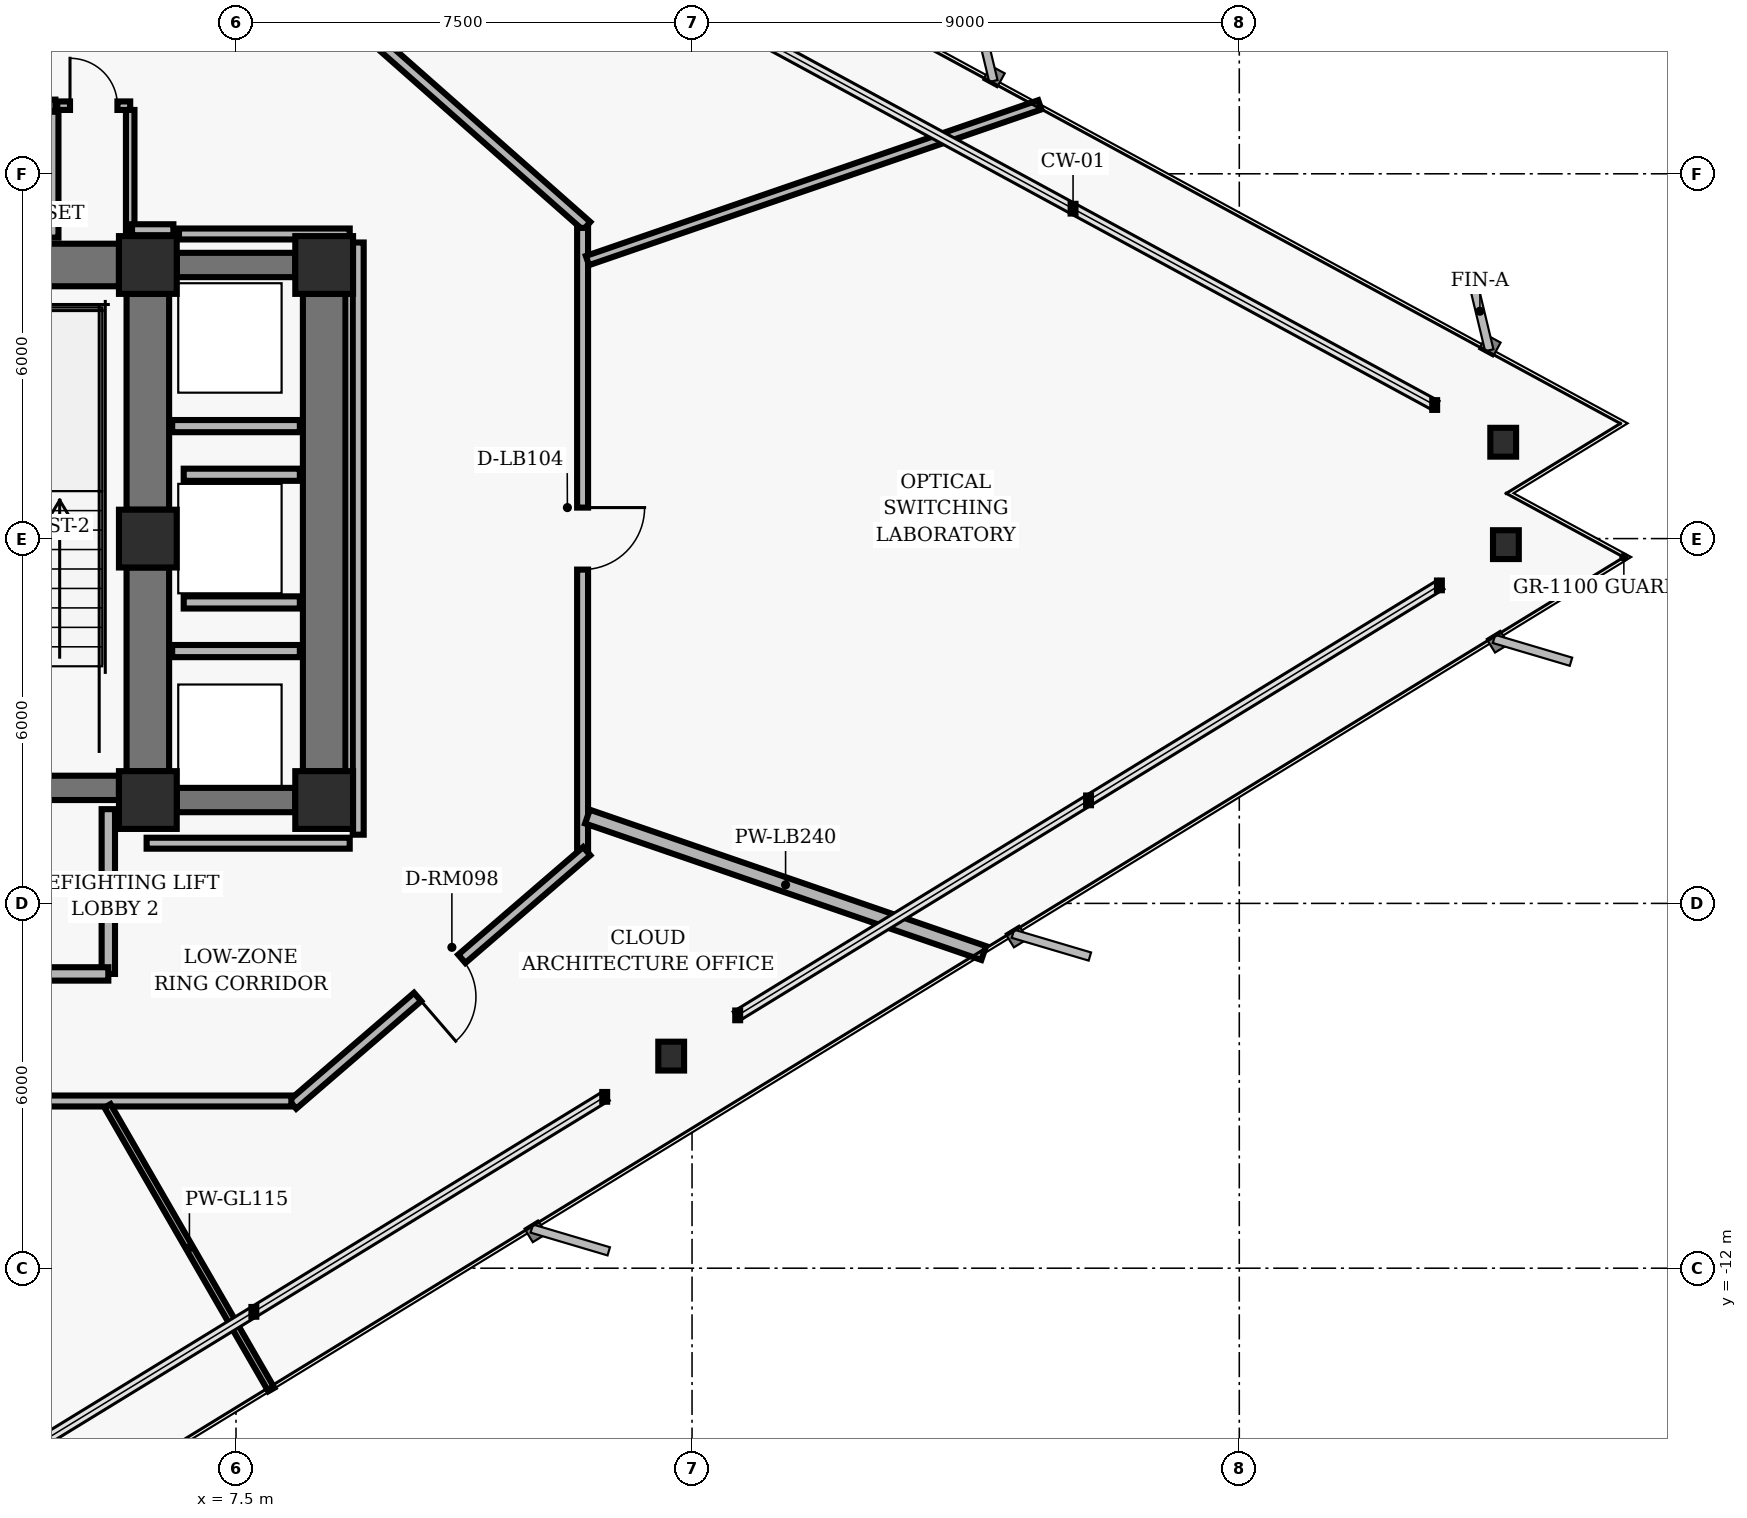
"""IFC4 building model, lengths in metres.
Left out: names, types, materials, properties, quantities, classifications, styles, units other than length and angle.
Written with IfcOpenShell. Run it as: python <this file> out.ifc"""

import sys

from ifc_helpers import new_model, si_unit, direction, frame, frame_2d, origin, origin_2d, place, context, subcontext, project, spatial, rectangle, hollow_rectangle, i_section, extrude, element, fill, save


model = new_model("IFC4")
c1 = context("Model", 3, precision=1e-05, world=origin(), true_north=direction((0.0, 1.0)))
c2 = subcontext(c1, "Body", "Model", "MODEL_VIEW")
j1 = project(units=[si_unit("LENGTHUNIT", "METRE"), si_unit("PLANEANGLEUNIT", "RADIAN")], contexts=[c1])
p1 = place(None, origin())
s1 = spatial("IfcSite", under=j1, at=p1, CompositionType="ELEMENT")
p2 = place(p1, origin())
s2 = spatial("IfcBuilding", under=s1, at=p2, CompositionType="ELEMENT")
p3 = place(p2, frame((0.0, 0.0, 39.04)))
s3 = spatial("IfcBuildingStorey", under=s2, at=p3, CompositionType="ELEMENT", Elevation=39.04)
for number, where, z_axis, x_axis in (
    (1, (6.05, 4.5, 0.0), (0.0, 0.0, 1.0), (1.0, 0.0, 0.0)),
    (2, (6.05, 0.0, 0.0), (0.0, 0.0, 1.0), (1.0, 0.0, 0.0)),
    (3, (6.05, -4.3, 0.0), (0.0, 0.0, 1.0), (1.0, 0.0, 0.0)),
    (4, (8.95, 4.5, 0.0), (0.0, 0.0, 1.0), (1.0, 0.0, 0.0)),
    (5, (8.95, -4.3, 0.0), (0.0, 0.0, 1.0), (1.0, 0.0, 0.0)),
):
    element("IfcColumn", number, at=place(p3, frame(where, z_axis=z_axis, x_axis=x_axis)), inside=s3, PredefinedType="COLUMN", context=c2, shape_type="SweptSolid", body=[
        extrude(hollow_rectangle(XDim=0.95, YDim=0.95, WallThickness=0.06, InnerFilletRadius=0.02, OuterFilletRadius=0.04, at=origin_2d()), origin(), (0.0, 0.0, 1.0), 3.36),
    ])
p4 = place(p3, frame((6.05, 0.475, 0.0), z_axis=(0.0, 0.0, 1.0), x_axis=(0.0, 1.0, 0.0)))
e6 = element("IfcWall", 6, at=p4, inside=s3, PredefinedType="SHEAR", context=c2, shape_type="SweptSolid", body=[
    extrude(rectangle(XDim=3.55, YDim=0.7, at=frame_2d((1.775, 0.0))), origin(), (0.0, 0.0, 1.0), 3.098),
])
p5 = place(p3, frame((6.05, -3.825, 0.0), z_axis=(0.0, 0.0, 1.0), x_axis=(0.0, 1.0, 0.0)))
e7 = element("IfcWall", 7, at=p5, inside=s3, PredefinedType="SHEAR", context=c2, shape_type="SweptSolid", body=[
    extrude(rectangle(XDim=3.35, YDim=0.7, at=frame_2d((1.675, 0.0))), origin(), (0.0, 0.0, 1.0), 3.098),
])
p6 = place(p3, frame((-5.575, -4.1, 0.0), z_axis=(0.0, 0.0, 1.0), x_axis=(1.0, 0.0, 0.0)))
e8 = element("IfcWall", 8, at=p6, inside=s3, PredefinedType="SHEAR", context=c2, shape_type="SweptSolid", body=[
    extrude(rectangle(XDim=11.15, YDim=0.4, at=frame_2d((5.575, 0.0))), origin(), (0.0, 0.0, 1.0), 3.098),
])
p7 = place(p6, frame((1.305, 0.0, 0.0)))
e9 = element("IfcOpeningElement", 9, at=p7, cuts=e8, PredefinedType="OPENING", context=c2, shape_type="SweptSolid", body=[
    extrude(rectangle(XDim=1.1, YDim=2.04, at=frame_2d((0.55, 1.02))), frame((0.0, 0.21, 0.0), z_axis=(0.0, -1.0, 0.0), x_axis=(1.0, 0.0, 0.0)), (0.0, 0.0, 1.0), 0.42),
])
p8 = place(p6, frame((8.745, 0.0, 0.0)))
e10 = element("IfcOpeningElement", 10, at=p8, cuts=e8, PredefinedType="OPENING", context=c2, shape_type="SweptSolid", body=[
    extrude(rectangle(XDim=1.1, YDim=2.04, at=frame_2d((0.55, 1.02))), frame((0.0, 0.21, 0.0), z_axis=(0.0, -1.0, 0.0), x_axis=(1.0, 0.0, 0.0)), (0.0, 0.0, 1.0), 0.42),
])
p9 = place(p6, frame((4.045, 0.0, 0.0)))
e11 = element("IfcOpeningElement", 11, at=p9, cuts=e8, PredefinedType="OPENING", context=c2, shape_type="SweptSolid", body=[
    extrude(rectangle(XDim=1.06, YDim=2.04, at=frame_2d((0.53, 1.02))), frame((0.0, 0.21, 0.0), z_axis=(0.0, -1.0, 0.0), x_axis=(1.0, 0.0, 0.0)), (0.0, 0.0, 1.0), 0.42),
])
p10 = place(p6, frame((6.045, 0.0, 0.0)))
e12 = element("IfcOpeningElement", 12, at=p10, cuts=e8, PredefinedType="OPENING", context=c2, shape_type="SweptSolid", body=[
    extrude(rectangle(XDim=1.06, YDim=2.04, at=frame_2d((0.53, 1.02))), frame((0.0, 0.21, 0.0), z_axis=(0.0, -1.0, 0.0), x_axis=(1.0, 0.0, 0.0)), (0.0, 0.0, 1.0), 0.42),
])
p11 = place(p3, frame((2.05, 4.5, 0.0), z_axis=(0.0, 0.0, 1.0), x_axis=(1.0, 0.0, 0.0)))
e13 = element("IfcWall", 13, at=p11, inside=s3, PredefinedType="SHEAR", context=c2, shape_type="SweptSolid", body=[
    extrude(rectangle(XDim=3.525, YDim=0.7, at=frame_2d((1.762, 0.0))), origin(), (0.0, 0.0, 1.0), 3.098),
])
p12 = place(p3, frame((8.95, -3.825, 0.0), z_axis=(0.0, 0.0, 1.0), x_axis=(0.0, 1.0, 0.0)))
e14 = element("IfcWall", 14, at=p12, inside=s3, PredefinedType="SHEAR", context=c2, shape_type="SweptSolid", body=[
    extrude(rectangle(XDim=7.85, YDim=0.7, at=frame_2d((3.925, 0.0))), origin(), (0.0, 0.0, 1.0), 3.098),
])
for number, where, z_axis, x_axis in (
    (15, (6.525, 4.5, 0.0), (0.0, 0.0, 1.0), (1.0, 0.0, 0.0)),
    (16, (6.525, -4.3, 0.0), (0.0, 0.0, 1.0), (1.0, 0.0, 0.0)),
):
    element("IfcWall", number, at=place(p3, frame(where, z_axis=z_axis, x_axis=x_axis)), inside=s3, PredefinedType="SHEAR", context=c2, shape_type="SweptSolid", body=[
        extrude(rectangle(XDim=1.95, YDim=0.4, at=frame_2d((0.975, 0.0))), origin(), (0.0, 0.0, 1.0), 3.098),
    ])
for number, where, z_axis, x_axis in (
    (17, (28.341, 1.585, 0.0), (0.0, 0.0, 1.0), (1.0, 0.0, 0.0)),
    (18, (14.657, -8.512, 0.0), (0.0, 0.0, 1.0), (1.0, 0.0, 0.0)),
    (19, (28.385, -0.1, 0.0), (0.0, 0.0, 1.0), (1.0, 0.0, 0.0)),
):
    element("IfcColumn", number, at=place(p3, frame(where, z_axis=z_axis, x_axis=x_axis)), inside=s3, PredefinedType="COLUMN", context=c2, shape_type="SweptSolid", body=[
        extrude(i_section(OverallWidth=0.424, OverallDepth=0.474, WebThickness=0.048, FlangeThickness=0.077, FilletRadius=0.025, at=origin_2d()), origin(), (0.0, 0.0, 1.0), 3.36),
    ])
p13 = place(p3, frame((5.4, -7.16, 0.0), z_axis=(0.0, 0.0, 1.0), x_axis=(0.0, 1.0, 0.0)))
e20 = element("IfcWall", 20, at=p13, inside=s3, PredefinedType="PARTITIONING", context=c2, shape_type="SweptSolid", body=[
    extrude(rectangle(XDim=2.71, YDim=0.22, at=frame_2d((1.355, 0.0))), origin(), (0.0, 0.0, 1.0), 3.073),
])
p14 = place(p3, frame((0.0, -7.16, 0.0), z_axis=(0.0, 0.0, 1.0), x_axis=(1.0, 0.0, 0.0)))
e21 = element("IfcWall", 21, at=p14, inside=s3, PredefinedType="PARTITIONING", context=c2, shape_type="SweptSolid", body=[
    extrude(rectangle(XDim=5.4, YDim=0.22, at=frame_2d((2.7, 0.0))), origin(), (0.0, 0.0, 1.0), 3.073),
])
p15 = place(p14, frame((2.05, 0.0, 0.0)))
e22 = element("IfcOpeningElement", 22, at=p15, cuts=e21, PredefinedType="OPENING", context=c2, shape_type="SweptSolid", body=[
    extrude(rectangle(XDim=1.12, YDim=2.02, at=frame_2d((0.56, 1.01))), frame((0.0, 0.12, 0.0), z_axis=(0.0, -1.0, 0.0), x_axis=(1.0, 0.0, 0.0)), (0.0, 0.0, 1.0), 0.24),
])
p16 = place(p3, frame((4.48, 4.95, 0.0), z_axis=(0.0, 0.0, 1.0), x_axis=(0.0, 1.0, 0.0)))
e23 = element("IfcWall", 23, at=p16, inside=s3, PredefinedType="PARTITIONING", context=c2, shape_type="SweptSolid", body=[
    extrude(rectangle(XDim=2.1, YDim=0.2, at=frame_2d((1.05, 0.0))), origin(), (0.0, 0.0, 1.0), 3.073),
])
p17 = place(p3, frame((2.15, 7.12, 0.0), z_axis=(0.0, 0.0, 1.0), x_axis=(1.0, 0.0, 0.0)))
e24 = element("IfcWall", 24, at=p17, inside=s3, PredefinedType="PARTITIONING", context=c2, shape_type="SweptSolid", body=[
    extrude(rectangle(XDim=2.38, YDim=0.2, at=frame_2d((1.19, 0.0))), origin(), (0.0, 0.0, 1.0), 3.073),
])
p18 = place(p17, frame((0.56, 0.0, 0.0)))
e25 = element("IfcOpeningElement", 25, at=p18, cuts=e24, PredefinedType="OPENING", context=c2, shape_type="SweptSolid", body=[
    extrude(rectangle(XDim=1.26, YDim=2.06, at=frame_2d((0.63, 1.03))), frame((0.0, 0.11, 0.0), z_axis=(0.0, -1.0, 0.0), x_axis=(1.0, 0.0, 0.0)), (0.0, 0.0, 1.0), 0.22),
])
p19 = place(p3, frame((5.76, 4.95, 0.0), z_axis=(0.0, 0.0, 1.0), x_axis=(0.0, 1.0, 0.0)))
e26 = element("IfcWall", 26, at=p19, inside=s3, PredefinedType="PARTITIONING", context=c2, shape_type="SweptSolid", body=[
    extrude(rectangle(XDim=2.1, YDim=0.14, at=frame_2d((1.05, 0.0))), origin(), (0.0, 0.0, 1.0), 3.073),
])
p20 = place(p3, frame((4.56, 7.12, 0.0), z_axis=(0.0, 0.0, 1.0), x_axis=(1.0, 0.0, 0.0)))
e27 = element("IfcWall", 27, at=p20, inside=s3, PredefinedType="PARTITIONING", context=c2, shape_type="SweptSolid", body=[
    extrude(rectangle(XDim=1.2, YDim=0.14, at=frame_2d((0.6, 0.0))), origin(), (0.0, 0.0, 1.0), 3.073),
])
p21 = place(p20, frame((0.21, 0.0, 0.0)))
e28 = element("IfcOpeningElement", 28, at=p21, cuts=e27, PredefinedType="OPENING", context=c2, shape_type="SweptSolid", body=[
    extrude(rectangle(XDim=0.78, YDim=2.01, at=frame_2d((0.39, 1.005))), frame((0.0, 0.08, 0.0), z_axis=(0.0, -1.0, 0.0), x_axis=(1.0, 0.0, 0.0)), (0.0, 0.0, 1.0), 0.16),
])
for number, where, z_axis, x_axis in (
    (29, (6.45, -1.85, 0.0), (0.0, 0.0, 1.0), (1.0, 0.0, 0.0)),
    (30, (6.45, 1.85, 0.0), (0.0, 0.0, 1.0), (1.0, 0.0, 0.0)),
):
    element("IfcWall", number, at=place(p3, frame(where, z_axis=z_axis, x_axis=x_axis)), inside=s3, PredefinedType="PARTITIONING", context=c2, shape_type="SweptSolid", body=[
        extrude(rectangle(XDim=2.1, YDim=0.2, at=frame_2d((1.05, 0.0))), origin(), (0.0, 0.0, 1.0), 3.073),
    ])
for number, where, z_axis, x_axis in (
    (31, (6.64, -1.05, 0.0), (0.0, 0.0, 1.0), (1.0, 0.0, 0.0)),
    (32, (6.64, 1.05, 0.0), (0.0, 0.0, 1.0), (1.0, 0.0, 0.0)),
):
    element("IfcWall", number, at=place(p3, frame(where, z_axis=z_axis, x_axis=x_axis)), inside=s3, PredefinedType="PARTITIONING", context=c2, shape_type="SweptSolid", body=[
        extrude(rectangle(XDim=1.91, YDim=0.2, at=frame_2d((0.955, 0.0))), origin(), (0.0, 0.0, 1.0), 3.073),
    ])
p22 = place(p3, frame((8.567, 9.29, 0.0), z_axis=(0.0, 0.0, 1.0), x_axis=(0.749626463267, -0.66186113768, 0.0)))
e33 = element("IfcWall", 33, at=p22, inside=s3, PredefinedType="PARTITIONING", context=c2, shape_type="SweptSolid", body=[
    extrude(rectangle(XDim=6.27, YDim=0.18, at=frame_2d((3.135, 0.0))), origin(), (0.0, 0.0, 1.0), 2.587),
])
p23 = place(p3, frame((13.2, 5.11, 0.0), z_axis=(0.0, 0.0, 1.0), x_axis=(0.0, -1.0, 0.0)))
e34 = element("IfcWall", 34, at=p23, inside=s3, PredefinedType="PARTITIONING", context=c2, shape_type="SweptSolid", body=[
    extrude(rectangle(XDim=10.22, YDim=0.18, at=frame_2d((5.11, 0.0))), origin(), (0.0, 0.0, 1.0), 3.073),
])
p24 = place(p23, frame((4.6, 0.0, 0.0)))
e35 = element("IfcOpeningElement", 35, at=p24, cuts=e34, PredefinedType="OPENING", context=c2, shape_type="SweptSolid", body=[
    extrude(rectangle(XDim=1.02, YDim=2.02, at=frame_2d((0.51, 1.01))), frame((0.0, 0.1, 0.0), z_axis=(0.0, -1.0, 0.0), x_axis=(1.0, 0.0, 0.0)), (0.0, 0.0, 1.0), 0.2),
])
p25 = place(p3, frame((13.268, -5.141, 0.0), z_axis=(0.0, 0.0, 1.0), x_axis=(-0.757534501725, -0.65279512766, 0.0)))
e36 = element("IfcWall", 36, at=p25, inside=s3, PredefinedType="PARTITIONING", context=c2, shape_type="SweptSolid", body=[
    extrude(rectangle(XDim=6.385, YDim=0.18, at=frame_2d((3.192, 0.0))), origin(), (0.0, 0.0, 1.0), 2.587),
])
p26 = place(p25, frame((2.712, 0.0, 0.0)))
e37 = element("IfcOpeningElement", 37, at=p26, cuts=e36, PredefinedType="OPENING", context=c2, shape_type="SweptSolid", body=[
    extrude(rectangle(XDim=0.96, YDim=2.02, at=frame_2d((0.48, 1.01))), frame((0.0, 0.1, 0.0), z_axis=(0.0, -1.0, 0.0), x_axis=(1.0, 0.0, 0.0)), (0.0, 0.0, 1.0), 0.2),
])
p27 = place(p3, frame((8.41, -9.25, 0.0), z_axis=(0.0, 0.0, 1.0), x_axis=(-1.0, 0.0, 0.0)))
e38 = element("IfcWall", 38, at=p27, inside=s3, PredefinedType="PARTITIONING", context=c2, shape_type="SweptSolid", body=[
    extrude(rectangle(XDim=17.0, YDim=0.18, at=frame_2d((8.5, 0.0))), origin(), (0.0, 0.0, 1.0), 2.587),
])
p28 = place(p27, frame((9.399, 0.0, 0.0)))
e39 = element("IfcOpeningElement", 39, at=p28, cuts=e38, PredefinedType="OPENING", context=c2, shape_type="SweptSolid", body=[
    extrude(rectangle(XDim=0.96, YDim=2.02, at=frame_2d((0.48, 1.01))), frame((0.0, 0.1, 0.0), z_axis=(0.0, -1.0, 0.0), x_axis=(1.0, 0.0, 0.0)), (0.0, 0.0, 1.0), 0.2),
])
p29 = place(p3, frame((6.03, -5.01, 0.0), z_axis=(0.0, 0.0, 1.0), x_axis=(1.0, 0.0, 0.0)))
e40 = element("IfcWall", 40, at=p29, inside=s3, PredefinedType="PARTITIONING", context=c2, shape_type="SweptSolid", body=[
    extrude(rectangle(XDim=3.34, YDim=0.18, at=frame_2d((1.67, 0.0))), origin(), (0.0, 0.0, 1.0), 3.073),
])
p30 = place(p3, frame((9.51, -4.87, 0.0), z_axis=(0.0, 0.0, 1.0), x_axis=(0.0, 1.0, 0.0)))
e41 = element("IfcWall", 41, at=p30, inside=s3, PredefinedType="PARTITIONING", context=c2, shape_type="SweptSolid", body=[
    extrude(rectangle(XDim=9.74, YDim=0.18, at=frame_2d((4.87, 0.0))), origin(), (0.0, 0.0, 1.0), 3.073),
])
p31 = place(p3, frame((9.37, 5.01, 0.0), z_axis=(0.0, 0.0, 1.0), x_axis=(-1.0, 0.0, 0.0)))
e42 = element("IfcWall", 42, at=p31, inside=s3, PredefinedType="PARTITIONING", context=c2, shape_type="SweptSolid", body=[
    extrude(rectangle(XDim=2.808, YDim=0.18, at=frame_2d((1.404, 0.0))), origin(), (0.0, 0.0, 1.0), 3.073),
])
p32 = place(p3, frame((6.47, 5.08, 0.0), z_axis=(0.0, 0.0, 1.0), x_axis=(-1.0, 0.0, 0.0)))
e43 = element("IfcWall", 43, at=p32, inside=s3, PredefinedType="PARTITIONING", context=c2, shape_type="SweptSolid", body=[
    extrude(rectangle(XDim=0.68, YDim=0.18, at=frame_2d((0.34, 0.0))), origin(), (0.0, 0.0, 1.0), 3.073),
])
p33 = place(p3, frame((5.387, -9.33, 0.0), z_axis=(0.0, 0.0, 1.0), x_axis=(0.500023165436, -0.866012028801, 0.0)))
e44 = element("IfcWall", 44, at=p33, inside=s3, PredefinedType="MOVABLE", context=c2, shape_type="SweptSolid", body=[
    extrude(rectangle(XDim=5.388, YDim=0.115, at=frame_2d((2.694, 0.0))), origin(), (0.0, 0.0, 1.0), 3.073),
])
p34 = place(p3, frame((13.28, -4.573, 0.0), z_axis=(0.0, 0.0, 1.0), x_axis=(0.945516314602, -0.325574720797, 0.0)))
e45 = element("IfcWall", 45, at=p34, inside=s3, PredefinedType="PARTITIONING", context=c2, shape_type="SweptSolid", body=[
    extrude(rectangle(XDim=6.892, YDim=0.24, at=frame_2d((3.446, 0.0))), origin(), (0.0, 0.0, 1.0), 3.073),
])
p35 = place(p3, frame((13.28, 4.573, 0.0), z_axis=(0.0, 0.0, 1.0), x_axis=(0.94552490271, 0.325549778613, 0.0)))
e46 = element("IfcWall", 46, at=p35, inside=s3, PredefinedType="PARTITIONING", context=c2, shape_type="SweptSolid", body=[
    extrude(rectangle(XDim=7.867, YDim=0.16, at=frame_2d((3.934, 0.0))), origin(), (0.0, 0.0, 1.0), 3.073),
])
p36 = place(p21, origin())
e47 = element("IfcDoor", 47, at=p36, inside=s3, OperationType="SINGLE_SWING_LEFT", PredefinedType="DOOR", context=c2, shape_type="SweptSolid", body=[
    extrude(rectangle(XDim=0.78, YDim=2.01, at=frame_2d((0.39, 1.005))), frame((0.0, 0.025, 0.0), z_axis=(0.0, -1.0, 0.0), x_axis=(1.0, 0.0, 0.0)), (0.0, 0.0, 1.0), 0.05),
])
fill(e28, e47)
p37 = place(p26, origin())
e48 = element("IfcDoor", 48, at=p37, inside=s3, OperationType="SINGLE_SWING_RIGHT", PredefinedType="DOOR", context=c2, shape_type="SweptSolid", body=[
    extrude(rectangle(XDim=0.96, YDim=2.02, at=frame_2d((0.48, 1.01))), frame((0.0, 0.025, 0.0), z_axis=(0.0, -1.0, 0.0), x_axis=(1.0, 0.0, 0.0)), (0.0, 0.0, 1.0), 0.05),
])
fill(e37, e48)
p38 = place(p24, origin())
e49 = element("IfcDoor", 49, at=p38, inside=s3, OperationType="SINGLE_SWING_LEFT", PredefinedType="DOOR", context=c2, shape_type="SweptSolid", body=[
    extrude(rectangle(XDim=1.02, YDim=2.02, at=frame_2d((0.51, 1.01))), frame((0.0, 0.025, 0.0), z_axis=(0.0, -1.0, 0.0), x_axis=(1.0, 0.0, 0.0)), (0.0, 0.0, 1.0), 0.05),
])
fill(e35, e49)
save(model, sys.argv[1])
